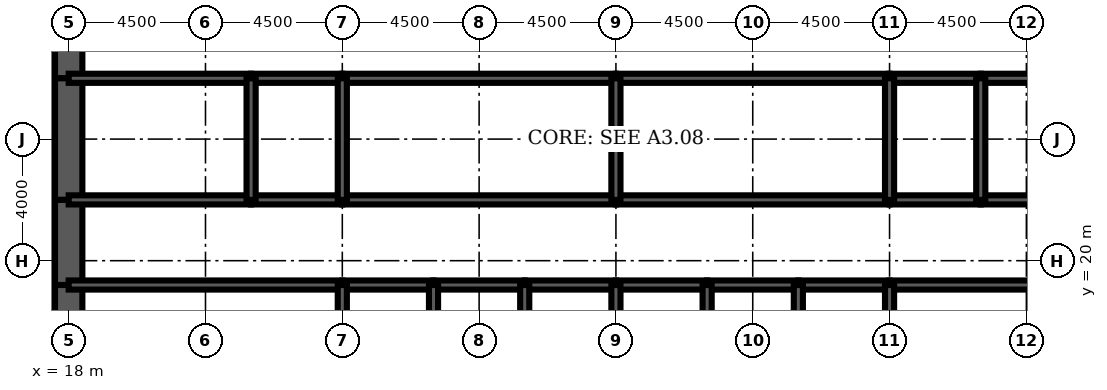
"""IFC4 building model, lengths in metres.
Left out: names, types, materials, properties, quantities, classifications, styles, units other than length and angle.
Written with IfcOpenShell. Run it as: python <this file> out.ifc"""

import sys

from ifc_helpers import new_model, si_unit, direction, frame, frame_2d, origin, place, context, subcontext, project, spatial, rectangle, extrude, element, fill, save


model = new_model("IFC4")
c1 = context("Model", 3, precision=1e-05, world=origin(), true_north=direction((0.0, 1.0)))
c2 = subcontext(c1, "Body", "Model", "MODEL_VIEW")
j1 = project(units=[si_unit("LENGTHUNIT", "METRE"), si_unit("PLANEANGLEUNIT", "RADIAN")], contexts=[c1])
p1 = place(None, origin())
s1 = spatial("IfcSite", under=j1, at=p1, CompositionType="ELEMENT")
p2 = place(p1, origin())
s2 = spatial("IfcBuilding", under=s1, at=p2, CompositionType="ELEMENT")
p3 = place(p2, frame((0.0, 0.0, 32.0)))
s3 = spatial("IfcBuildingStorey", under=s2, at=p3, CompositionType="ELEMENT", Elevation=32.0)
p4 = place(p3, frame((18.0, 28.8, 0.0), z_axis=(0.0, 0.0, 1.0), x_axis=(0.0, -1.0, 0.0)))
e1 = element("IfcWall", 1, at=p4, inside=s3, PredefinedType="SHEAR", context=c2, shape_type="SweptSolid", body=[
    extrude(rectangle(XDim=2.8, YDim=0.9, at=frame_2d((1.4, 0.0))), origin(), (0.0, 0.0, 1.0), 4.5),
])
p5 = place(p4, frame((0.4, 0.0, 0.0)))
e2 = element("IfcOpeningElement", 2, at=p5, cuts=e1, PredefinedType="OPENING", context=c2, shape_type="SweptSolid", body=[
    extrude(rectangle(XDim=1.8, YDim=2.1, at=frame_2d((0.9, 1.05))), frame((0.0, 0.46, 0.0), z_axis=(0.0, -1.0, 0.0), x_axis=(1.0, 0.0, 0.0)), (0.0, 0.0, 1.0), 0.92),
])
p6 = place(p3, frame((18.0, 26.0, 0.0), z_axis=(0.0, 0.0, 1.0), x_axis=(0.0, -1.0, 0.0)))
e3 = element("IfcWall", 3, at=p6, inside=s3, PredefinedType="SHEAR", context=c2, shape_type="SweptSolid", body=[
    extrude(rectangle(XDim=4.0, YDim=0.9, at=frame_2d((2.0, 0.0))), origin(), (0.0, 0.0, 1.0), 4.5),
])
p7 = place(p3, frame((18.0, 22.0, 0.0), z_axis=(0.0, 0.0, 1.0), x_axis=(0.0, -1.0, 0.0)))
e4 = element("IfcWall", 4, at=p7, inside=s3, PredefinedType="SHEAR", context=c2, shape_type="SweptSolid", body=[
    extrude(rectangle(XDim=2.8, YDim=0.9, at=frame_2d((1.4, 0.0))), origin(), (0.0, 0.0, 1.0), 4.5),
])
p8 = place(p7, frame((0.6, 0.0, 0.0)))
e5 = element("IfcOpeningElement", 5, at=p8, cuts=e4, PredefinedType="OPENING", context=c2, shape_type="SweptSolid", body=[
    extrude(rectangle(XDim=1.8, YDim=2.1, at=frame_2d((0.9, 1.05))), frame((0.0, 0.46, 0.0), z_axis=(0.0, -1.0, 0.0), x_axis=(1.0, 0.0, 0.0)), (0.0, 0.0, 1.0), 0.92),
])
p9 = place(p3, frame((18.0, 19.2, 0.0), z_axis=(0.0, 0.0, 1.0), x_axis=(0.0, -1.0, 0.0)))
e6 = element("IfcWall", 6, at=p9, inside=s3, PredefinedType="SHEAR", context=c2, shape_type="SweptSolid", body=[
    extrude(rectangle(XDim=3.2, YDim=0.9, at=frame_2d((1.6, 0.0))), origin(), (0.0, 0.0, 1.0), 4.5),
])
p10 = place(p3, frame((18.0, 19.2, 0.0), z_axis=(0.0, 0.0, 1.0), x_axis=(1.0, 0.0, 0.0)))
e7 = element("IfcWall", 7, at=p10, inside=s3, PredefinedType="SOLIDWALL", context=c2, shape_type="SweptSolid", body=[
    extrude(rectangle(XDim=9.0, YDim=0.3, at=frame_2d((4.5, 0.0))), origin(), (0.0, 0.0, 1.0), 4.5),
])
p11 = place(p10, frame((0.65, 0.0, 0.0)))
e8 = element("IfcOpeningElement", 8, at=p11, cuts=e7, PredefinedType="OPENING", context=c2, shape_type="SweptSolid", body=[
    extrude(rectangle(XDim=1.0, YDim=2.1, at=frame_2d((0.5, 1.05))), frame((0.0, 0.16, 0.0), z_axis=(0.0, -1.0, 0.0), x_axis=(1.0, 0.0, 0.0)), (0.0, 0.0, 1.0), 0.32),
])
p12 = place(p3, frame((27.0, 19.2, 0.0), z_axis=(0.0, 0.0, 1.0), x_axis=(1.0, 0.0, 0.0)))
e9 = element("IfcWall", 9, at=p12, inside=s3, PredefinedType="SOLIDWALL", context=c2, shape_type="SweptSolid", body=[
    extrude(rectangle(XDim=3.0, YDim=0.3, at=frame_2d((1.5, 0.0))), origin(), (0.0, 0.0, 1.0), 4.5),
])
p13 = place(p12, frame((0.95, 0.0, 0.0)))
e10 = element("IfcOpeningElement", 10, at=p13, cuts=e9, PredefinedType="OPENING", context=c2, shape_type="SweptSolid", body=[
    extrude(rectangle(XDim=1.1, YDim=2.2, at=frame_2d((0.55, 1.1))), frame((0.0, 0.16, 0.0), z_axis=(0.0, -1.0, 0.0), x_axis=(1.0, 0.0, 0.0)), (0.0, 0.0, 1.0), 0.32),
])
p14 = place(p3, frame((30.0, 19.2, 0.0), z_axis=(0.0, 0.0, 1.0), x_axis=(1.0, 0.0, 0.0)))
e11 = element("IfcWall", 11, at=p14, inside=s3, PredefinedType="SOLIDWALL", context=c2, shape_type="SweptSolid", body=[
    extrude(rectangle(XDim=3.0, YDim=0.3, at=frame_2d((1.5, 0.0))), origin(), (0.0, 0.0, 1.0), 4.5),
])
p15 = place(p14, frame((0.95, 0.0, 0.0)))
e12 = element("IfcOpeningElement", 12, at=p15, cuts=e11, PredefinedType="OPENING", context=c2, shape_type="SweptSolid", body=[
    extrude(rectangle(XDim=1.1, YDim=2.2, at=frame_2d((0.55, 1.1))), frame((0.0, 0.16, 0.0), z_axis=(0.0, -1.0, 0.0), x_axis=(1.0, 0.0, 0.0)), (0.0, 0.0, 1.0), 0.32),
])
p16 = place(p3, frame((33.0, 19.2, 0.0), z_axis=(0.0, 0.0, 1.0), x_axis=(1.0, 0.0, 0.0)))
e13 = element("IfcWall", 13, at=p16, inside=s3, PredefinedType="SOLIDWALL", context=c2, shape_type="SweptSolid", body=[
    extrude(rectangle(XDim=3.0, YDim=0.3, at=frame_2d((1.5, 0.0))), origin(), (0.0, 0.0, 1.0), 4.5),
])
p17 = place(p16, frame((0.95, 0.0, 0.0)))
e14 = element("IfcOpeningElement", 14, at=p17, cuts=e13, PredefinedType="OPENING", context=c2, shape_type="SweptSolid", body=[
    extrude(rectangle(XDim=1.1, YDim=2.2, at=frame_2d((0.55, 1.1))), frame((0.0, 0.16, 0.0), z_axis=(0.0, -1.0, 0.0), x_axis=(1.0, 0.0, 0.0)), (0.0, 0.0, 1.0), 0.32),
])
p18 = place(p3, frame((36.0, 19.2, 0.0), z_axis=(0.0, 0.0, 1.0), x_axis=(1.0, 0.0, 0.0)))
e15 = element("IfcWall", 15, at=p18, inside=s3, PredefinedType="SOLIDWALL", context=c2, shape_type="SweptSolid", body=[
    extrude(rectangle(XDim=3.0, YDim=0.3, at=frame_2d((1.5, 0.0))), origin(), (0.0, 0.0, 1.0), 4.5),
])
p19 = place(p18, frame((0.95, 0.0, 0.0)))
e16 = element("IfcOpeningElement", 16, at=p19, cuts=e15, PredefinedType="OPENING", context=c2, shape_type="SweptSolid", body=[
    extrude(rectangle(XDim=1.1, YDim=2.2, at=frame_2d((0.55, 1.1))), frame((0.0, 0.16, 0.0), z_axis=(0.0, -1.0, 0.0), x_axis=(1.0, 0.0, 0.0)), (0.0, 0.0, 1.0), 0.32),
])
for number, where, z_axis, x_axis in (
    (17, (39.0, 19.2, 0.0), (0.0, 0.0, 1.0), (1.0, 0.0, 0.0)),
    (18, (42.0, 19.2, 0.0), (0.0, 0.0, 1.0), (1.0, 0.0, 0.0)),
):
    element("IfcWall", number, at=place(p3, frame(where, z_axis=z_axis, x_axis=x_axis)), inside=s3, PredefinedType="SOLIDWALL", context=c2, shape_type="SweptSolid", body=[
        extrude(rectangle(XDim=3.0, YDim=0.3, at=frame_2d((1.5, 0.0))), origin(), (0.0, 0.0, 1.0), 4.5),
    ])
p20 = place(p3, frame((45.0, 19.2, 0.0), z_axis=(0.0, 0.0, 1.0), x_axis=(1.0, 0.0, 0.0)))
e19 = element("IfcWall", 19, at=p20, inside=s3, PredefinedType="SOLIDWALL", context=c2, shape_type="SweptSolid", body=[
    extrude(rectangle(XDim=9.0, YDim=0.3, at=frame_2d((4.5, 0.0))), origin(), (0.0, 0.0, 1.0), 4.5),
])
p21 = place(p20, frame((7.35, 0.0, 0.0)))
e20 = element("IfcOpeningElement", 20, at=p21, cuts=e19, PredefinedType="OPENING", context=c2, shape_type="SweptSolid", body=[
    extrude(rectangle(XDim=1.0, YDim=2.1, at=frame_2d((0.5, 1.05))), frame((0.0, 0.16, 0.0), z_axis=(0.0, -1.0, 0.0), x_axis=(1.0, 0.0, 0.0)), (0.0, 0.0, 1.0), 0.32),
])
p22 = place(p3, frame((18.0, 22.0, 0.0), z_axis=(0.0, 0.0, 1.0), x_axis=(1.0, 0.0, 0.0)))
e21 = element("IfcWall", 21, at=p22, inside=s3, PredefinedType="SOLIDWALL", context=c2, shape_type="SweptSolid", body=[
    extrude(rectangle(XDim=6.0, YDim=0.3, at=frame_2d((3.0, 0.0))), origin(), (0.0, 0.0, 1.0), 4.5),
])
p23 = place(p22, frame((4.4, 0.0, 0.0)))
e22 = element("IfcOpeningElement", 22, at=p23, cuts=e21, PredefinedType="OPENING", context=c2, shape_type="SweptSolid", body=[
    extrude(rectangle(XDim=1.0, YDim=2.1, at=frame_2d((0.5, 1.05))), frame((0.0, 0.16, 0.0), z_axis=(0.0, -1.0, 0.0), x_axis=(1.0, 0.0, 0.0)), (0.0, 0.0, 1.0), 0.32),
])
p24 = place(p22, frame((1.0, 0.0, 0.0)))
e23 = element("IfcOpeningElement", 23, at=p24, cuts=e21, PredefinedType="OPENING", context=c2, shape_type="SweptSolid", body=[
    extrude(rectangle(XDim=1.0, YDim=2.1, at=frame_2d((0.5, 1.05))), frame((0.0, 0.16, 0.0), z_axis=(0.0, -1.0, 0.0), x_axis=(1.0, 0.0, 0.0)), (0.0, 0.0, 1.0), 0.32),
])
p25 = place(p3, frame((24.0, 22.0, 0.0), z_axis=(0.0, 0.0, 1.0), x_axis=(1.0, 0.0, 0.0)))
e24 = element("IfcWall", 24, at=p25, inside=s3, PredefinedType="SOLIDWALL", context=c2, shape_type="SweptSolid", body=[
    extrude(rectangle(XDim=3.0, YDim=0.3, at=frame_2d((1.5, 0.0))), origin(), (0.0, 0.0, 1.0), 4.5),
])
p26 = place(p25, frame((1.0, 0.0, 0.0)))
e25 = element("IfcOpeningElement", 25, at=p26, cuts=e24, PredefinedType="OPENING", context=c2, shape_type="SweptSolid", body=[
    extrude(rectangle(XDim=1.0, YDim=2.1, at=frame_2d((0.5, 1.05))), frame((0.0, 0.16, 0.0), z_axis=(0.0, -1.0, 0.0), x_axis=(1.0, 0.0, 0.0)), (0.0, 0.0, 1.0), 0.32),
])
p27 = place(p3, frame((27.0, 22.0, 0.0), z_axis=(0.0, 0.0, 1.0), x_axis=(1.0, 0.0, 0.0)))
e26 = element("IfcWall", 26, at=p27, inside=s3, PredefinedType="SOLIDWALL", context=c2, shape_type="SweptSolid", body=[
    extrude(rectangle(XDim=9.0, YDim=0.3, at=frame_2d((4.5, 0.0))), origin(), (0.0, 0.0, 1.0), 4.5),
])
p28 = place(p27, frame((4.0, 0.0, 0.0)))
e27 = element("IfcOpeningElement", 27, at=p28, cuts=e26, PredefinedType="OPENING", context=c2, shape_type="SweptSolid", body=[
    extrude(rectangle(XDim=1.0, YDim=2.1, at=frame_2d((0.5, 1.05))), frame((0.0, 0.16, 0.0), z_axis=(0.0, -1.0, 0.0), x_axis=(1.0, 0.0, 0.0)), (0.0, 0.0, 1.0), 0.32),
])
p29 = place(p3, frame((36.0, 22.0, 0.0), z_axis=(0.0, 0.0, 1.0), x_axis=(1.0, 0.0, 0.0)))
e28 = element("IfcWall", 28, at=p29, inside=s3, PredefinedType="SOLIDWALL", context=c2, shape_type="SweptSolid", body=[
    extrude(rectangle(XDim=9.0, YDim=0.3, at=frame_2d((4.5, 0.0))), origin(), (0.0, 0.0, 1.0), 4.5),
])
p30 = place(p29, frame((4.0, 0.0, 0.0)))
e29 = element("IfcOpeningElement", 29, at=p30, cuts=e28, PredefinedType="OPENING", context=c2, shape_type="SweptSolid", body=[
    extrude(rectangle(XDim=1.0, YDim=2.1, at=frame_2d((0.5, 1.05))), frame((0.0, 0.16, 0.0), z_axis=(0.0, -1.0, 0.0), x_axis=(1.0, 0.0, 0.0)), (0.0, 0.0, 1.0), 0.32),
])
p31 = place(p3, frame((45.0, 22.0, 0.0), z_axis=(0.0, 0.0, 1.0), x_axis=(1.0, 0.0, 0.0)))
e30 = element("IfcWall", 30, at=p31, inside=s3, PredefinedType="SOLIDWALL", context=c2, shape_type="SweptSolid", body=[
    extrude(rectangle(XDim=3.0, YDim=0.3, at=frame_2d((1.5, 0.0))), origin(), (0.0, 0.0, 1.0), 4.5),
])
p32 = place(p31, frame((1.0, 0.0, 0.0)))
e31 = element("IfcOpeningElement", 31, at=p32, cuts=e30, PredefinedType="OPENING", context=c2, shape_type="SweptSolid", body=[
    extrude(rectangle(XDim=1.0, YDim=2.1, at=frame_2d((0.5, 1.05))), frame((0.0, 0.16, 0.0), z_axis=(0.0, -1.0, 0.0), x_axis=(1.0, 0.0, 0.0)), (0.0, 0.0, 1.0), 0.32),
])
p33 = place(p3, frame((48.0, 22.0, 0.0), z_axis=(0.0, 0.0, 1.0), x_axis=(1.0, 0.0, 0.0)))
e32 = element("IfcWall", 32, at=p33, inside=s3, PredefinedType="SOLIDWALL", context=c2, shape_type="SweptSolid", body=[
    extrude(rectangle(XDim=6.0, YDim=0.3, at=frame_2d((3.0, 0.0))), origin(), (0.0, 0.0, 1.0), 4.5),
])
p34 = place(p33, frame((2.0, 0.0, 0.0)))
e33 = element("IfcOpeningElement", 33, at=p34, cuts=e32, PredefinedType="OPENING", context=c2, shape_type="SweptSolid", body=[
    extrude(rectangle(XDim=1.0, YDim=2.1, at=frame_2d((0.5, 1.05))), frame((0.0, 0.16, 0.0), z_axis=(0.0, -1.0, 0.0), x_axis=(1.0, 0.0, 0.0)), (0.0, 0.0, 1.0), 0.32),
])
p35 = place(p3, frame((18.0, 26.0, 0.0), z_axis=(0.0, 0.0, 1.0), x_axis=(1.0, 0.0, 0.0)))
e34 = element("IfcWall", 34, at=p35, inside=s3, PredefinedType="SOLIDWALL", context=c2, shape_type="SweptSolid", body=[
    extrude(rectangle(XDim=6.0, YDim=0.3, at=frame_2d((3.0, 0.0))), origin(), (0.0, 0.0, 1.0), 4.5),
])
p36 = place(p3, frame((24.0, 26.0, 0.0), z_axis=(0.0, 0.0, 1.0), x_axis=(1.0, 0.0, 0.0)))
e35 = element("IfcWall", 35, at=p36, inside=s3, PredefinedType="SOLIDWALL", context=c2, shape_type="SweptSolid", body=[
    extrude(rectangle(XDim=3.0, YDim=0.3, at=frame_2d((1.5, 0.0))), origin(), (0.0, 0.0, 1.0), 4.5),
])
for number, where, z_axis, x_axis in (
    (36, (27.0, 26.0, 0.0), (0.0, 0.0, 1.0), (1.0, 0.0, 0.0)),
    (37, (36.0, 26.0, 0.0), (0.0, 0.0, 1.0), (1.0, 0.0, 0.0)),
):
    element("IfcWall", number, at=place(p3, frame(where, z_axis=z_axis, x_axis=x_axis)), inside=s3, PredefinedType="SOLIDWALL", context=c2, shape_type="SweptSolid", body=[
        extrude(rectangle(XDim=9.0, YDim=0.3, at=frame_2d((4.5, 0.0))), origin(), (0.0, 0.0, 1.0), 4.5),
    ])
p37 = place(p3, frame((45.0, 26.0, 0.0), z_axis=(0.0, 0.0, 1.0), x_axis=(1.0, 0.0, 0.0)))
e38 = element("IfcWall", 38, at=p37, inside=s3, PredefinedType="SOLIDWALL", context=c2, shape_type="SweptSolid", body=[
    extrude(rectangle(XDim=3.0, YDim=0.3, at=frame_2d((1.5, 0.0))), origin(), (0.0, 0.0, 1.0), 4.5),
])
p38 = place(p3, frame((48.0, 26.0, 0.0), z_axis=(0.0, 0.0, 1.0), x_axis=(1.0, 0.0, 0.0)))
e39 = element("IfcWall", 39, at=p38, inside=s3, PredefinedType="SOLIDWALL", context=c2, shape_type="SweptSolid", body=[
    extrude(rectangle(XDim=6.0, YDim=0.3, at=frame_2d((3.0, 0.0))), origin(), (0.0, 0.0, 1.0), 4.5),
])
for number, where, z_axis, x_axis in (
    (40, (27.0, 16.0, 0.0), (0.0, 0.0, 1.0), (0.0, 1.0, 0.0)),
    (41, (30.0, 16.0, 0.0), (0.0, 0.0, 1.0), (0.0, 1.0, 0.0)),
    (42, (33.0, 16.0, 0.0), (0.0, 0.0, 1.0), (0.0, 1.0, 0.0)),
    (43, (36.0, 16.0, 0.0), (0.0, 0.0, 1.0), (0.0, 1.0, 0.0)),
    (44, (39.0, 16.0, 0.0), (0.0, 0.0, 1.0), (0.0, 1.0, 0.0)),
    (45, (42.0, 16.0, 0.0), (0.0, 0.0, 1.0), (0.0, 1.0, 0.0)),
    (46, (45.0, 16.0, 0.0), (0.0, 0.0, 1.0), (0.0, 1.0, 0.0)),
):
    element("IfcWall", number, at=place(p3, frame(where, z_axis=z_axis, x_axis=x_axis)), inside=s3, PredefinedType="SOLIDWALL", context=c2, shape_type="SweptSolid", body=[
        extrude(rectangle(XDim=3.2, YDim=0.3, at=frame_2d((1.6, 0.0))), origin(), (0.0, 0.0, 1.0), 4.5),
    ])
for number, where, z_axis, x_axis in (
    (47, (24.0, 22.0, 0.0), (0.0, 0.0, 1.0), (0.0, 1.0, 0.0)),
    (48, (27.0, 22.0, 0.0), (0.0, 0.0, 1.0), (0.0, 1.0, 0.0)),
    (49, (36.0, 22.0, 0.0), (0.0, 0.0, 1.0), (0.0, 1.0, 0.0)),
    (50, (45.0, 22.0, 0.0), (0.0, 0.0, 1.0), (0.0, 1.0, 0.0)),
    (51, (48.0, 22.0, 0.0), (0.0, 0.0, 1.0), (0.0, 1.0, 0.0)),
):
    element("IfcWall", number, at=place(p3, frame(where, z_axis=z_axis, x_axis=x_axis)), inside=s3, PredefinedType="SOLIDWALL", context=c2, shape_type="SweptSolid", body=[
        extrude(rectangle(XDim=4.0, YDim=0.3, at=frame_2d((2.0, 0.0))), origin(), (0.0, 0.0, 1.0), 4.5),
    ])
p39 = place(p3, frame((39.0, 22.15, 0.0), z_axis=(0.0, 0.0, 1.0), x_axis=(0.0, 1.0, 0.0)))
e52 = element("IfcWall", 52, at=p39, inside=s3, PredefinedType="PARTITIONING", context=c2, shape_type="SweptSolid", body=[
    extrude(rectangle(XDim=3.7, YDim=0.15, at=frame_2d((1.85, 0.0))), origin(), (0.0, 0.0, 1.0), 3.0),
])
p40 = place(p39, frame((2.2, 0.0, 0.0)))
e53 = element("IfcOpeningElement", 53, at=p40, cuts=e52, PredefinedType="OPENING", context=c2, shape_type="SweptSolid", body=[
    extrude(rectangle(XDim=1.0, YDim=2.1, at=frame_2d((0.5, 1.05))), frame((0.0, 0.085, 0.0), z_axis=(0.0, -1.0, 0.0), x_axis=(1.0, 0.0, 0.0)), (0.0, 0.0, 1.0), 0.17),
])
p41 = place(p3, frame((20.625, 22.15, 0.0), z_axis=(0.0, 0.0, 1.0), x_axis=(0.0, 1.0, 0.0)))
e54 = element("IfcWall", 54, at=p41, inside=s3, PredefinedType="PARTITIONING", context=c2, shape_type="SweptSolid", body=[
    extrude(rectangle(XDim=3.7, YDim=0.15, at=frame_2d((1.85, 0.0))), origin(), (0.0, 0.0, 1.0), 3.0),
])
p42 = place(p3, frame((48.6, 19.35, 0.0), z_axis=(0.0, 0.0, 1.0), x_axis=(0.0, 1.0, 0.0)))
e55 = element("IfcWall", 55, at=p42, inside=s3, PredefinedType="PARTITIONING", context=c2, shape_type="SweptSolid", body=[
    extrude(rectangle(XDim=2.5, YDim=0.15, at=frame_2d((1.25, 0.0))), origin(), (0.0, 0.0, 1.0), 3.0),
])
p43 = place(p42, frame((1.15, 0.0, 0.0)))
e56 = element("IfcOpeningElement", 56, at=p43, cuts=e55, PredefinedType="OPENING", context=c2, shape_type="SweptSolid", body=[
    extrude(rectangle(XDim=1.0, YDim=2.1, at=frame_2d((0.5, 1.05))), frame((0.0, 0.085, 0.0), z_axis=(0.0, -1.0, 0.0), x_axis=(1.0, 0.0, 0.0)), (0.0, 0.0, 1.0), 0.17),
])
p44 = place(p40, origin())
e57 = element("IfcDoor", 57, at=p44, inside=s3, OperationType="SINGLE_SWING_RIGHT", PredefinedType="DOOR", context=c2, shape_type="SweptSolid", body=[
    extrude(rectangle(XDim=1.0, YDim=2.1, at=frame_2d((0.5, 1.05))), frame((0.0, 0.025, 0.0), z_axis=(0.0, -1.0, 0.0), x_axis=(1.0, 0.0, 0.0)), (0.0, 0.0, 1.0), 0.05),
])
fill(e53, e57)
p45 = place(p43, origin())
e58 = element("IfcDoor", 58, at=p45, inside=s3, OperationType="SINGLE_SWING_RIGHT", PredefinedType="DOOR", context=c2, shape_type="SweptSolid", body=[
    extrude(rectangle(XDim=1.0, YDim=2.1, at=frame_2d((0.5, 1.05))), frame((0.0, 0.025, 0.0), z_axis=(0.0, -1.0, 0.0), x_axis=(1.0, 0.0, 0.0)), (0.0, 0.0, 1.0), 0.05),
])
fill(e56, e58)
p46 = place(p13, origin())
e59 = element("IfcDoor", 59, at=p46, inside=s3, OperationType="DOUBLE_DOOR_SLIDING", PredefinedType="USERDEFINED", context=c2, shape_type="SweptSolid", body=[
    extrude(rectangle(XDim=1.1, YDim=2.2, at=frame_2d((0.55, 1.1))), frame((0.0, 0.025, 0.0), z_axis=(0.0, -1.0, 0.0), x_axis=(1.0, 0.0, 0.0)), (0.0, 0.0, 1.0), 0.05),
])
fill(e10, e59)
p47 = place(p15, origin())
e60 = element("IfcDoor", 60, at=p47, inside=s3, OperationType="DOUBLE_DOOR_SLIDING", PredefinedType="USERDEFINED", context=c2, shape_type="SweptSolid", body=[
    extrude(rectangle(XDim=1.1, YDim=2.2, at=frame_2d((0.55, 1.1))), frame((0.0, 0.025, 0.0), z_axis=(0.0, -1.0, 0.0), x_axis=(1.0, 0.0, 0.0)), (0.0, 0.0, 1.0), 0.05),
])
fill(e12, e60)
p48 = place(p17, origin())
e61 = element("IfcDoor", 61, at=p48, inside=s3, OperationType="DOUBLE_DOOR_SLIDING", PredefinedType="USERDEFINED", context=c2, shape_type="SweptSolid", body=[
    extrude(rectangle(XDim=1.1, YDim=2.2, at=frame_2d((0.55, 1.1))), frame((0.0, 0.025, 0.0), z_axis=(0.0, -1.0, 0.0), x_axis=(1.0, 0.0, 0.0)), (0.0, 0.0, 1.0), 0.05),
])
fill(e14, e61)
p49 = place(p19, origin())
e62 = element("IfcDoor", 62, at=p49, inside=s3, OperationType="DOUBLE_DOOR_SLIDING", PredefinedType="USERDEFINED", context=c2, shape_type="SweptSolid", body=[
    extrude(rectangle(XDim=1.1, YDim=2.2, at=frame_2d((0.55, 1.1))), frame((0.0, 0.025, 0.0), z_axis=(0.0, -1.0, 0.0), x_axis=(1.0, 0.0, 0.0)), (0.0, 0.0, 1.0), 0.05),
])
fill(e16, e62)
p50 = place(p11, origin())
e63 = element("IfcDoor", 63, at=p50, inside=s3, OperationType="SINGLE_SWING_LEFT", PredefinedType="DOOR", context=c2, shape_type="SweptSolid", body=[
    extrude(rectangle(XDim=1.0, YDim=2.1, at=frame_2d((0.5, 1.05))), frame((0.0, 0.025, 0.0), z_axis=(0.0, -1.0, 0.0), x_axis=(1.0, 0.0, 0.0)), (0.0, 0.0, 1.0), 0.05),
])
fill(e8, e63)
p51 = place(p8, origin())
e64 = element("IfcDoor", 64, at=p51, inside=s3, OperationType="SINGLE_SWING_LEFT", PredefinedType="DOOR", context=c2, shape_type="SweptSolid", body=[
    extrude(rectangle(XDim=1.8, YDim=2.1, at=frame_2d((0.9, 1.05))), frame((0.0, 0.45, 0.0), z_axis=(0.0, -1.0, 0.0), x_axis=(1.0, 0.0, 0.0)), (0.0, 0.0, 1.0), 0.899),
])
fill(e5, e64)
p52 = place(p5, origin())
e65 = element("IfcDoor", 65, at=p52, inside=s3, OperationType="SINGLE_SWING_LEFT", PredefinedType="DOOR", context=c2, shape_type="SweptSolid", body=[
    extrude(rectangle(XDim=1.8, YDim=2.1, at=frame_2d((0.9, 1.05))), frame((0.0, 0.45, 0.0), z_axis=(0.0, -1.0, 0.0), x_axis=(1.0, 0.0, 0.0)), (0.0, 0.0, 1.0), 0.899),
])
fill(e2, e65)
p53 = place(p23, origin())
e66 = element("IfcDoor", 66, at=p53, inside=s3, OperationType="SINGLE_SWING_RIGHT", PredefinedType="DOOR", context=c2, shape_type="SweptSolid", body=[
    extrude(rectangle(XDim=1.0, YDim=2.1, at=frame_2d((0.5, 1.05))), frame((0.0, 0.025, 0.0), z_axis=(0.0, -1.0, 0.0), x_axis=(1.0, 0.0, 0.0)), (0.0, 0.0, 1.0), 0.05),
])
fill(e22, e66)
p54 = place(p26, origin())
e67 = element("IfcDoor", 67, at=p54, inside=s3, OperationType="SINGLE_SWING_LEFT", PredefinedType="DOOR", context=c2, shape_type="SweptSolid", body=[
    extrude(rectangle(XDim=1.0, YDim=2.1, at=frame_2d((0.5, 1.05))), frame((0.0, 0.025, 0.0), z_axis=(0.0, -1.0, 0.0), x_axis=(1.0, 0.0, 0.0)), (0.0, 0.0, 1.0), 0.05),
])
fill(e25, e67)
p55 = place(p28, origin())
e68 = element("IfcDoor", 68, at=p55, inside=s3, OperationType="SINGLE_SWING_LEFT", PredefinedType="DOOR", context=c2, shape_type="SweptSolid", body=[
    extrude(rectangle(XDim=1.0, YDim=2.1, at=frame_2d((0.5, 1.05))), frame((0.0, 0.025, 0.0), z_axis=(0.0, -1.0, 0.0), x_axis=(1.0, 0.0, 0.0)), (0.0, 0.0, 1.0), 0.05),
])
fill(e27, e68)
p56 = place(p30, origin())
e69 = element("IfcDoor", 69, at=p56, inside=s3, OperationType="SINGLE_SWING_LEFT", PredefinedType="DOOR", context=c2, shape_type="SweptSolid", body=[
    extrude(rectangle(XDim=1.0, YDim=2.1, at=frame_2d((0.5, 1.05))), frame((0.0, 0.025, 0.0), z_axis=(0.0, -1.0, 0.0), x_axis=(1.0, 0.0, 0.0)), (0.0, 0.0, 1.0), 0.05),
])
fill(e29, e69)
p57 = place(p32, origin())
e70 = element("IfcDoor", 70, at=p57, inside=s3, OperationType="SINGLE_SWING_LEFT", PredefinedType="DOOR", context=c2, shape_type="SweptSolid", body=[
    extrude(rectangle(XDim=1.0, YDim=2.1, at=frame_2d((0.5, 1.05))), frame((0.0, 0.025, 0.0), z_axis=(0.0, -1.0, 0.0), x_axis=(1.0, 0.0, 0.0)), (0.0, 0.0, 1.0), 0.05),
])
fill(e31, e70)
p58 = place(p24, origin())
e71 = element("IfcDoor", 71, at=p58, inside=s3, OperationType="SINGLE_SWING_LEFT", PredefinedType="DOOR", context=c2, shape_type="SweptSolid", body=[
    extrude(rectangle(XDim=1.0, YDim=2.1, at=frame_2d((0.5, 1.05))), frame((0.0, 0.025, 0.0), z_axis=(0.0, -1.0, 0.0), x_axis=(1.0, 0.0, 0.0)), (0.0, 0.0, 1.0), 0.05),
])
fill(e23, e71)
save(model, sys.argv[1])
